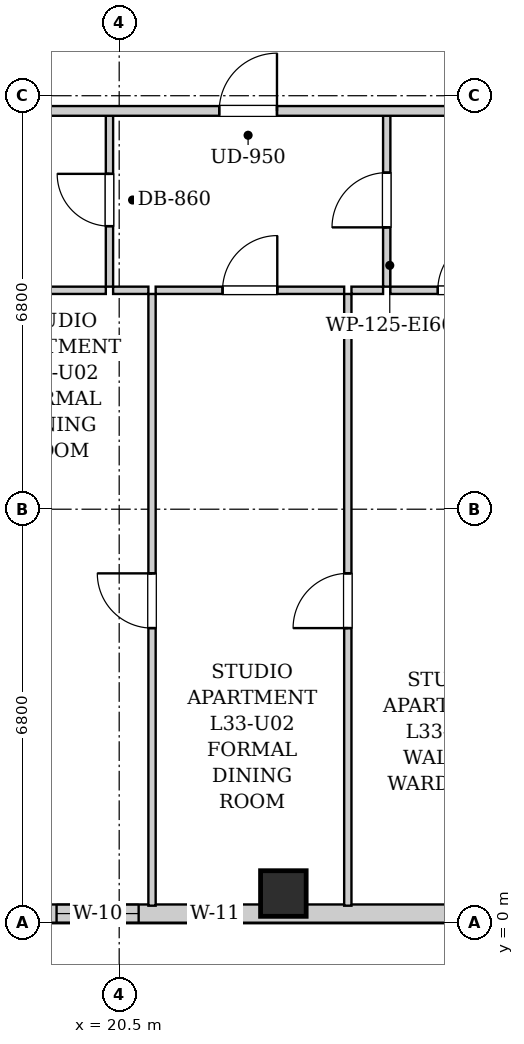
"""IFC4 building model, lengths in metres.
Left out: names, types, materials, properties, quantities, classifications, styles, units other than length and angle.
Written with IfcOpenShell. Run it as: python <this file> out.ifc"""

import sys

from ifc_helpers import new_model, si_unit, direction, frame, frame_2d, origin, origin_2d, place, context, subcontext, project, spatial, rectangle, extrude, element, fill, save


model = new_model("IFC4")
c1 = context("Model", 3, precision=1e-05, world=origin(), true_north=direction((0.0, 1.0)))
c2 = subcontext(c1, "Body", "Model", "MODEL_VIEW")
j1 = project(units=[si_unit("LENGTHUNIT", "METRE"), si_unit("PLANEANGLEUNIT", "RADIAN")], contexts=[c1])
p1 = place(None, origin())
s1 = spatial("IfcSite", under=j1, at=p1, CompositionType="ELEMENT")
p2 = place(p1, origin())
s2 = spatial("IfcBuilding", under=s1, at=p2, CompositionType="ELEMENT")
p3 = place(p2, frame((0.0, 0.0, 116.7)))
s3 = spatial("IfcBuildingStorey", under=s2, at=p3, CompositionType="ELEMENT", Elevation=116.7)
p4 = place(p3, frame((23.2, 0.48, 0.0), z_axis=(0.0, 0.0, 1.0), x_axis=(1.0, 0.0, 0.0)))
e1 = element("IfcColumn", 1, at=p4, inside=s3, PredefinedType="COLUMN", context=c2, shape_type="SweptSolid", body=[
    extrude(rectangle(XDim=0.75, YDim=0.75, at=origin_2d()), origin(), (0.0, 0.0, 1.0), 3.2),
])
p5 = place(p3, frame((40.9, 0.15, 0.0), z_axis=(0.0, 0.0, 1.0), x_axis=(-1.0, 0.0, 0.0)))
e2 = element("IfcWall", 2, at=p5, inside=s3, PredefinedType="SOLIDWALL", context=c2, shape_type="SweptSolid", body=[
    extrude(rectangle(XDim=21.95, YDim=0.3, at=frame_2d((10.975, 0.0))), origin(), (0.0, 0.0, 1.0), 2.88),
])
p6 = place(p5, frame((20.08, 0.0, 0.55)))
e3 = element("IfcOpeningElement", 3, at=p6, cuts=e2, PredefinedType="OPENING", context=c2, shape_type="SweptSolid", body=[
    extrude(rectangle(XDim=1.35, YDim=1.2, at=frame_2d((0.675, 0.6))), frame((0.0, 0.16, 0.0), z_axis=(0.0, -1.0, 0.0), x_axis=(1.0, 0.0, 0.0)), (0.0, 0.0, 1.0), 0.32),
])
p7 = place(p5, frame((18.4, 0.0, 0.55)))
e4 = element("IfcOpeningElement", 4, at=p7, cuts=e2, PredefinedType="OPENING", context=c2, shape_type="SweptSolid", body=[
    extrude(rectangle(XDim=0.85, YDim=1.2, at=frame_2d((0.425, 0.6))), frame((0.0, 0.16, 0.0), z_axis=(0.0, -1.0, 0.0), x_axis=(1.0, 0.0, 0.0)), (0.0, 0.0, 1.0), 0.32),
])
p8 = place(p5, frame((11.127, 0.0, 0.55)))
e5 = element("IfcOpeningElement", 5, at=p8, cuts=e2, PredefinedType="OPENING", context=c2, shape_type="SweptSolid", body=[
    extrude(rectangle(XDim=1.35, YDim=1.2, at=frame_2d((0.675, 0.6))), frame((0.0, 0.16, 0.0), z_axis=(0.0, -1.0, 0.0), x_axis=(1.0, 0.0, 0.0)), (0.0, 0.0, 1.0), 0.32),
])
p9 = place(p5, frame((8.235, 0.0, 0.55)))
e6 = element("IfcOpeningElement", 6, at=p9, cuts=e2, PredefinedType="OPENING", context=c2, shape_type="SweptSolid", body=[
    extrude(rectangle(XDim=1.35, YDim=1.2, at=frame_2d((0.675, 0.6))), frame((0.0, 0.16, 0.0), z_axis=(0.0, -1.0, 0.0), x_axis=(1.0, 0.0, 0.0)), (0.0, 0.0, 1.0), 0.32),
])
p10 = place(p5, frame((4.835, 0.0, 0.55)))
e7 = element("IfcOpeningElement", 7, at=p10, cuts=e2, PredefinedType="OPENING", context=c2, shape_type="SweptSolid", body=[
    extrude(rectangle(XDim=1.35, YDim=1.2, at=frame_2d((0.675, 0.6))), frame((0.0, 0.16, 0.0), z_axis=(0.0, -1.0, 0.0), x_axis=(1.0, 0.0, 0.0)), (0.0, 0.0, 1.0), 0.32),
])
p11 = place(p3, frame((20.34, 10.46, 0.0), z_axis=(0.0, 0.0, 1.0), x_axis=(0.0, 1.0, 0.0)))
e8 = element("IfcWall", 8, at=p11, inside=s3, PredefinedType="PARTITIONING", context=c2, shape_type="SweptSolid", body=[
    extrude(rectangle(XDim=2.85, YDim=0.12, at=frame_2d((1.425, 0.0))), origin(), (0.0, 0.0, 1.0), 2.88),
])
p12 = place(p11, frame((0.995, 0.0, 0.0)))
e9 = element("IfcOpeningElement", 9, at=p12, cuts=e8, PredefinedType="OPENING", context=c2, shape_type="SweptSolid", body=[
    extrude(rectangle(XDim=0.86, YDim=2.05, at=frame_2d((0.43, 1.025))), frame((0.0, 0.07, 0.0), z_axis=(0.0, -1.0, 0.0), x_axis=(1.0, 0.0, 0.0)), (0.0, 0.0, 1.0), 0.14),
])
p13 = place(p3, frame((17.88, 10.4, 0.0), z_axis=(0.0, 0.0, 1.0), x_axis=(1.0, 0.0, 0.0)))
e10 = element("IfcWall", 10, at=p13, inside=s3, PredefinedType="PARTITIONING", context=c2, shape_type="SweptSolid", body=[
    extrude(rectangle(XDim=2.4, YDim=0.12, at=frame_2d((1.2, 0.0))), origin(), (0.0, 0.0, 1.0), 2.88),
])
p14 = place(p3, frame((24.9, 10.46, 0.0), z_axis=(0.0, 0.0, 1.0), x_axis=(0.0, 1.0, 0.0)))
e11 = element("IfcWall", 11, at=p14, inside=s3, PredefinedType="PARTITIONING", context=c2, shape_type="SweptSolid", body=[
    extrude(rectangle(XDim=2.85, YDim=0.12, at=frame_2d((1.425, 0.0))), origin(), (0.0, 0.0, 1.0), 2.88),
])
p15 = place(p14, frame((0.975, 0.0, 0.0)))
e12 = element("IfcOpeningElement", 12, at=p15, cuts=e11, PredefinedType="OPENING", context=c2, shape_type="SweptSolid", body=[
    extrude(rectangle(XDim=0.9, YDim=2.05, at=frame_2d((0.45, 1.025))), frame((0.0, 0.07, 0.0), z_axis=(0.0, -1.0, 0.0), x_axis=(1.0, 0.0, 0.0)), (0.0, 0.0, 1.0), 0.14),
])
p16 = place(p3, frame((20.4, 10.4, 0.0), z_axis=(0.0, 0.0, 1.0), x_axis=(1.0, 0.0, 0.0)))
e13 = element("IfcWall", 13, at=p16, inside=s3, PredefinedType="PARTITIONING", context=c2, shape_type="SweptSolid", body=[
    extrude(rectangle(XDim=0.58, YDim=0.12, at=frame_2d((0.29, 0.0))), origin(), (0.0, 0.0, 1.0), 2.88),
])
p17 = place(p3, frame((21.1, 10.4, 0.0), z_axis=(0.0, 0.0, 1.0), x_axis=(1.0, 0.0, 0.0)))
e14 = element("IfcWall", 14, at=p17, inside=s3, PredefinedType="PARTITIONING", context=c2, shape_type="SweptSolid", body=[
    extrude(rectangle(XDim=3.1, YDim=0.12, at=frame_2d((1.55, 0.0))), origin(), (0.0, 0.0, 1.0), 2.88),
])
p18 = place(p17, frame((1.1, 0.0, 0.0)))
e15 = element("IfcOpeningElement", 15, at=p18, cuts=e14, PredefinedType="OPENING", context=c2, shape_type="SweptSolid", body=[
    extrude(rectangle(XDim=0.9, YDim=2.05, at=frame_2d((0.45, 1.025))), frame((0.0, 0.07, 0.0), z_axis=(0.0, -1.0, 0.0), x_axis=(1.0, 0.0, 0.0)), (0.0, 0.0, 1.0), 0.14),
])
p19 = place(p3, frame((24.32, 10.4, 0.0), z_axis=(0.0, 0.0, 1.0), x_axis=(1.0, 0.0, 0.0)))
e16 = element("IfcWall", 16, at=p19, inside=s3, PredefinedType="PARTITIONING", context=c2, shape_type="SweptSolid", body=[
    extrude(rectangle(XDim=0.52, YDim=0.12, at=frame_2d((0.26, 0.0))), origin(), (0.0, 0.0, 1.0), 2.88),
])
p20 = place(p3, frame((24.96, 10.4, 0.0), z_axis=(0.0, 0.0, 1.0), x_axis=(1.0, 0.0, 0.0)))
e17 = element("IfcWall", 17, at=p20, inside=s3, PredefinedType="PARTITIONING", context=c2, shape_type="SweptSolid", body=[
    extrude(rectangle(XDim=2.46, YDim=0.12, at=frame_2d((1.23, 0.0))), origin(), (0.0, 0.0, 1.0), 2.88),
])
p21 = place(p20, frame((0.78, 0.0, 0.0)))
e18 = element("IfcOpeningElement", 18, at=p21, cuts=e17, PredefinedType="OPENING", context=c2, shape_type="SweptSolid", body=[
    extrude(rectangle(XDim=0.9, YDim=2.05, at=frame_2d((0.45, 1.025))), frame((0.0, 0.07, 0.0), z_axis=(0.0, -1.0, 0.0), x_axis=(1.0, 0.0, 0.0)), (0.0, 0.0, 1.0), 0.14),
])
p22 = place(p3, frame((21.04, 0.28, 0.0), z_axis=(0.0, 0.0, 1.0), x_axis=(0.0, 1.0, 0.0)))
e19 = element("IfcWall", 19, at=p22, inside=s3, PredefinedType="PARTITIONING", context=c2, shape_type="SweptSolid", body=[
    extrude(rectangle(XDim=10.06, YDim=0.12, at=frame_2d((5.03, 0.0))), origin(), (0.0, 0.0, 1.0), 2.88),
])
p23 = place(p22, frame((4.565, 0.0, 0.0)))
e20 = element("IfcOpeningElement", 20, at=p23, cuts=e19, PredefinedType="OPENING", context=c2, shape_type="SweptSolid", body=[
    extrude(rectangle(XDim=0.9, YDim=2.05, at=frame_2d((0.45, 1.025))), frame((0.0, 0.07, 0.0), z_axis=(0.0, -1.0, 0.0), x_axis=(1.0, 0.0, 0.0)), (0.0, 0.0, 1.0), 0.14),
])
p24 = place(p3, frame((24.26, 0.28, 0.0), z_axis=(0.0, 0.0, 1.0), x_axis=(0.0, 1.0, 0.0)))
e21 = element("IfcWall", 21, at=p24, inside=s3, PredefinedType="PARTITIONING", context=c2, shape_type="SweptSolid", body=[
    extrude(rectangle(XDim=10.06, YDim=0.12, at=frame_2d((5.03, 0.0))), origin(), (0.0, 0.0, 1.0), 2.88),
])
p25 = place(p24, frame((4.565, 0.0, 0.0)))
e22 = element("IfcOpeningElement", 22, at=p25, cuts=e21, PredefinedType="OPENING", context=c2, shape_type="SweptSolid", body=[
    extrude(rectangle(XDim=0.9, YDim=2.05, at=frame_2d((0.45, 1.025))), frame((0.0, 0.07, 0.0), z_axis=(0.0, -1.0, 0.0), x_axis=(1.0, 0.0, 0.0)), (0.0, 0.0, 1.0), 0.14),
])
p26 = place(p3, frame((10.05, 13.35, 0.0), z_axis=(0.0, 0.0, 1.0), x_axis=(1.0, 0.0, 0.0)))
e23 = element("IfcWall", 23, at=p26, inside=s3, PredefinedType="PARTITIONING", context=c2, shape_type="SweptSolid", body=[
    extrude(rectangle(XDim=30.8, YDim=0.16, at=frame_2d((15.4, 0.0))), origin(), (0.0, 0.0, 1.0), 2.88),
])
p27 = place(p26, frame((3.692, 0.0, 0.0)))
e24 = element("IfcOpeningElement", 24, at=p27, cuts=e23, PredefinedType="OPENING", context=c2, shape_type="SweptSolid", body=[
    extrude(rectangle(XDim=0.95, YDim=2.1, at=frame_2d((0.475, 1.05))), frame((0.0, 0.09, 0.0), z_axis=(0.0, -1.0, 0.0), x_axis=(1.0, 0.0, 0.0)), (0.0, 0.0, 1.0), 0.18),
])
p28 = place(p26, frame((12.095, 0.0, 0.0)))
e25 = element("IfcOpeningElement", 25, at=p28, cuts=e23, PredefinedType="OPENING", context=c2, shape_type="SweptSolid", body=[
    extrude(rectangle(XDim=0.95, YDim=2.1, at=frame_2d((0.475, 1.05))), frame((0.0, 0.09, 0.0), z_axis=(0.0, -1.0, 0.0), x_axis=(1.0, 0.0, 0.0)), (0.0, 0.0, 1.0), 0.18),
])
p29 = place(p12, origin())
e26 = element("IfcDoor", 26, at=p29, inside=s3, OperationType="SINGLE_SWING_RIGHT", PredefinedType="DOOR", context=c2, shape_type="SweptSolid", body=[
    extrude(rectangle(XDim=0.86, YDim=2.05, at=frame_2d((0.43, 1.025))), frame((0.0, 0.025, 0.0), z_axis=(0.0, -1.0, 0.0), x_axis=(1.0, 0.0, 0.0)), (0.0, 0.0, 1.0), 0.05),
])
fill(e9, e26)
p30 = place(p15, origin())
e27 = element("IfcDoor", 27, at=p30, inside=s3, OperationType="SINGLE_SWING_LEFT", PredefinedType="DOOR", context=c2, shape_type="SweptSolid", body=[
    extrude(rectangle(XDim=0.9, YDim=2.05, at=frame_2d((0.45, 1.025))), frame((0.0, 0.025, 0.0), z_axis=(0.0, -1.0, 0.0), x_axis=(1.0, 0.0, 0.0)), (0.0, 0.0, 1.0), 0.05),
])
fill(e12, e27)
p31 = place(p18, origin())
e28 = element("IfcDoor", 28, at=p31, inside=s3, OperationType="SINGLE_SWING_RIGHT", PredefinedType="DOOR", context=c2, shape_type="SweptSolid", body=[
    extrude(rectangle(XDim=0.9, YDim=2.05, at=frame_2d((0.45, 1.025))), frame((0.0, 0.025, 0.0), z_axis=(0.0, -1.0, 0.0), x_axis=(1.0, 0.0, 0.0)), (0.0, 0.0, 1.0), 0.05),
])
fill(e15, e28)
p32 = place(p21, origin())
e29 = element("IfcDoor", 29, at=p32, inside=s3, OperationType="SINGLE_SWING_RIGHT", PredefinedType="DOOR", context=c2, shape_type="SweptSolid", body=[
    extrude(rectangle(XDim=0.9, YDim=2.05, at=frame_2d((0.45, 1.025))), frame((0.0, 0.025, 0.0), z_axis=(0.0, -1.0, 0.0), x_axis=(1.0, 0.0, 0.0)), (0.0, 0.0, 1.0), 0.05),
])
fill(e18, e29)
p33 = place(p23, origin())
e30 = element("IfcDoor", 30, at=p33, inside=s3, OperationType="SINGLE_SWING_RIGHT", PredefinedType="DOOR", context=c2, shape_type="SweptSolid", body=[
    extrude(rectangle(XDim=0.9, YDim=2.05, at=frame_2d((0.45, 1.025))), frame((0.0, 0.025, 0.0), z_axis=(0.0, -1.0, 0.0), x_axis=(1.0, 0.0, 0.0)), (0.0, 0.0, 1.0), 0.05),
])
fill(e20, e30)
p34 = place(p25, origin())
e31 = element("IfcDoor", 31, at=p34, inside=s3, OperationType="SINGLE_SWING_LEFT", PredefinedType="DOOR", context=c2, shape_type="SweptSolid", body=[
    extrude(rectangle(XDim=0.9, YDim=2.05, at=frame_2d((0.45, 1.025))), frame((0.0, 0.025, 0.0), z_axis=(0.0, -1.0, 0.0), x_axis=(1.0, 0.0, 0.0)), (0.0, 0.0, 1.0), 0.05),
])
fill(e22, e31)
p35 = place(p28, origin())
e32 = element("IfcDoor", 32, at=p35, inside=s3, OperationType="SINGLE_SWING_RIGHT", PredefinedType="DOOR", context=c2, shape_type="SweptSolid", body=[
    extrude(rectangle(XDim=0.95, YDim=2.1, at=frame_2d((0.475, 1.05))), frame((0.0, 0.025, 0.0), z_axis=(0.0, -1.0, 0.0), x_axis=(1.0, 0.0, 0.0)), (0.0, 0.0, 1.0), 0.05),
])
fill(e25, e32)
p36 = place(p6, origin())
e33 = element("IfcWindow", 33, at=p36, inside=s3, PartitioningType="SINGLE_PANEL", PredefinedType="WINDOW", context=c2, shape_type="SweptSolid", body=[
    extrude(rectangle(XDim=1.35, YDim=1.2, at=frame_2d((0.675, 0.6))), frame((0.0, 0.03, 0.0), z_axis=(0.0, -1.0, 0.0), x_axis=(1.0, 0.0, 0.0)), (0.0, 0.0, 1.0), 0.06),
])
fill(e3, e33)
p37 = place(p7, origin())
e34 = element("IfcWindow", 34, at=p37, inside=s3, PartitioningType="SINGLE_PANEL", PredefinedType="WINDOW", context=c2, shape_type="SweptSolid", body=[
    extrude(rectangle(XDim=0.85, YDim=1.2, at=frame_2d((0.425, 0.6))), frame((0.0, 0.03, 0.0), z_axis=(0.0, -1.0, 0.0), x_axis=(1.0, 0.0, 0.0)), (0.0, 0.0, 1.0), 0.06),
])
fill(e4, e34)
save(model, sys.argv[1])
